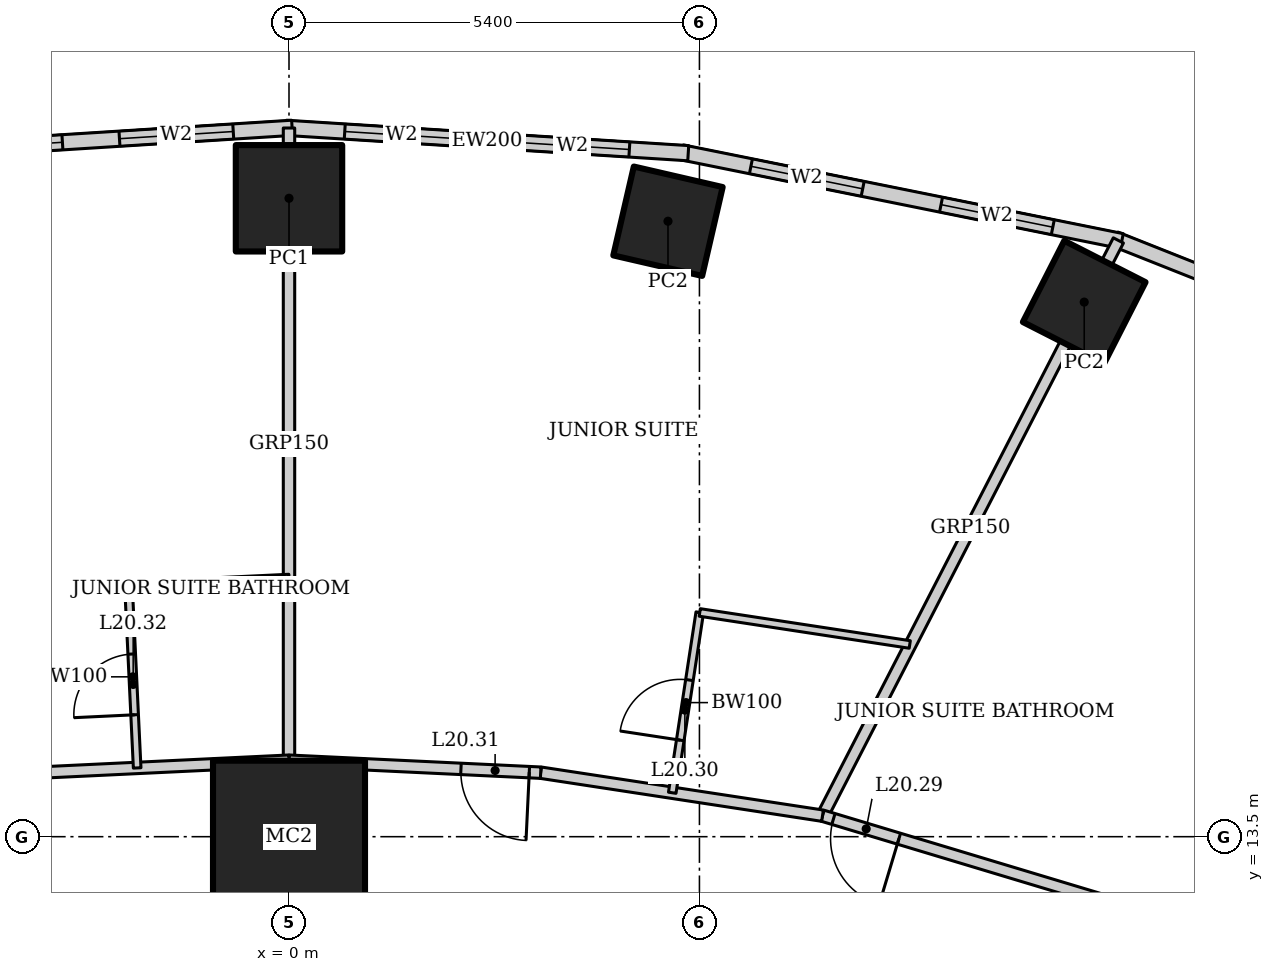
"""IFC4 building model, lengths in metres.
Left out: names, types, materials, properties, quantities, classifications, styles, units other than length and angle.
Written with IfcOpenShell. Run it as: python <this file> out.ifc"""

import sys

from ifc_helpers import new_model, si_unit, direction, frame, frame_2d, origin, origin_2d, place, context, subcontext, project, spatial, rectangle, hollow_rectangle, extrude, element, fill, save


model = new_model("IFC4")
c1 = context("Model", 3, precision=1e-05, world=origin(), true_north=direction((0.0, 1.0)))
c2 = subcontext(c1, "Body", "Model", "MODEL_VIEW")
j1 = project(units=[si_unit("LENGTHUNIT", "METRE"), si_unit("PLANEANGLEUNIT", "RADIAN")], contexts=[c1])
p1 = place(None, origin())
s1 = spatial("IfcSite", under=j1, at=p1, CompositionType="ELEMENT")
p2 = place(p1, origin())
s2 = spatial("IfcBuilding", under=s1, at=p2, CompositionType="ELEMENT")
p3 = place(p2, frame((0.0, 0.0, 87.4)))
s3 = spatial("IfcBuildingStorey", under=s2, at=p3, CompositionType="ELEMENT", Elevation=87.4)
p4 = place(p3, frame((0.0, 13.5, 0.0), z_axis=(0.0, 0.0, 1.0), x_axis=(1.0, 0.0, 0.0)))
e1 = element("IfcColumn", 1, at=p4, inside=s3, PredefinedType="COLUMN", context=c2, shape_type="SweptSolid", body=[
    extrude(hollow_rectangle(XDim=2.0, YDim=2.0, WallThickness=0.17, at=origin_2d()), origin(), (0.0, 0.0, 1.0), 3.6),
])
for number, where, z_axis, x_axis in (
    (2, (10.463, 20.534, 0.0), (0.0, 0.0, 1.0), (0.454, 0.891, 0.0)),
    (3, (4.986, 21.598, 0.0), (0.0, 0.0, 1.0), (0.225, 0.974, 0.0)),
):
    element("IfcColumn", number, at=place(p3, frame(where, z_axis=z_axis, x_axis=x_axis)), inside=s3, PredefinedType="COLUMN", context=c2, shape_type="SweptSolid", body=[
        extrude(hollow_rectangle(XDim=1.2, YDim=1.2, WallThickness=0.1, at=origin_2d()), origin(), (0.0, 0.0, 1.0), 3.6),
    ])
p5 = place(p3, frame((0.0, 21.9, 0.0), z_axis=(0.0, 0.0, 1.0), x_axis=(1.0, 0.0, 0.0)))
e4 = element("IfcColumn", 4, at=p5, inside=s3, PredefinedType="COLUMN", context=c2, shape_type="SweptSolid", body=[
    extrude(hollow_rectangle(XDim=1.4, YDim=1.4, WallThickness=0.1, at=origin_2d()), origin(), (0.0, 0.0, 1.0), 3.6),
])
p6 = place(p3, frame((18.018, 18.523, 0.0), z_axis=(0.0, 0.0, 1.0), x_axis=(-0.929358351251, 0.369178892895, 0.0)))
e5 = element("IfcWall", 5, at=p6, inside=s3, PredefinedType="SOLIDWALL", context=c2, shape_type="SweptSolid", body=[
    extrude(rectangle(XDim=7.692, YDim=0.2, at=frame_2d((3.846, 0.0))), origin(), (0.0, 0.0, 1.0), 3.45),
])
p7 = place(p6, frame((1.373, 0.0, 0.5)))
e6 = element("IfcOpeningElement", 6, at=p7, cuts=e5, PredefinedType="OPENING", context=c2, shape_type="SweptSolid", body=[
    extrude(rectangle(XDim=1.5, YDim=2.2, at=frame_2d((0.75, 1.1))), frame((0.0, 0.11, 0.0), z_axis=(0.0, -1.0, 0.0), x_axis=(1.0, 0.0, 0.0)), (0.0, 0.0, 1.0), 0.22),
])
p8 = place(p6, frame((4.819, 0.0, 0.5)))
e7 = element("IfcOpeningElement", 7, at=p8, cuts=e5, PredefinedType="OPENING", context=c2, shape_type="SweptSolid", body=[
    extrude(rectangle(XDim=1.5, YDim=2.2, at=frame_2d((0.75, 1.1))), frame((0.0, 0.11, 0.0), z_axis=(0.0, -1.0, 0.0), x_axis=(1.0, 0.0, 0.0)), (0.0, 0.0, 1.0), 0.22),
])
p9 = place(p3, frame((10.957, 21.337, 0.0), z_axis=(0.0, 0.0, 1.0), x_axis=(-0.980251657452, 0.197754110105, 0.0)))
e8 = element("IfcWall", 8, at=p9, inside=s3, PredefinedType="SOLIDWALL", context=c2, shape_type="SweptSolid", body=[
    extrude(rectangle(XDim=5.904, YDim=0.2, at=frame_2d((2.952, 0.0))), origin(), (0.0, 0.0, 1.0), 3.45),
])
p10 = place(p9, frame((0.926, 0.0, 0.5)))
e9 = element("IfcOpeningElement", 9, at=p10, cuts=e8, PredefinedType="OPENING", context=c2, shape_type="SweptSolid", body=[
    extrude(rectangle(XDim=1.5, YDim=2.2, at=frame_2d((0.75, 1.1))), frame((0.0, 0.11, 0.0), z_axis=(0.0, -1.0, 0.0), x_axis=(1.0, 0.0, 0.0)), (0.0, 0.0, 1.0), 0.22),
])
p11 = place(p9, frame((3.478, 0.0, 0.5)))
e10 = element("IfcOpeningElement", 10, at=p11, cuts=e8, PredefinedType="OPENING", context=c2, shape_type="SweptSolid", body=[
    extrude(rectangle(XDim=1.5, YDim=2.2, at=frame_2d((0.75, 1.1))), frame((0.0, 0.11, 0.0), z_axis=(0.0, -1.0, 0.0), x_axis=(1.0, 0.0, 0.0)), (0.0, 0.0, 1.0), 0.22),
])
p12 = place(p3, frame((5.253, 22.493, 0.0), z_axis=(0.0, 0.0, 1.0), x_axis=(-0.998018582375, 0.062919863585, 0.0)))
e11 = element("IfcWall", 11, at=p12, inside=s3, PredefinedType="SOLIDWALL", context=c2, shape_type="SweptSolid", body=[
    extrude(rectangle(XDim=5.304, YDim=0.2, at=frame_2d((2.652, 0.0))), origin(), (0.0, 0.0, 1.0), 3.45),
])
p13 = place(p12, frame((0.776, 0.0, 0.5)))
e12 = element("IfcOpeningElement", 12, at=p13, cuts=e11, PredefinedType="OPENING", context=c2, shape_type="SweptSolid", body=[
    extrude(rectangle(XDim=1.5, YDim=2.2, at=frame_2d((0.75, 1.1))), frame((0.0, 0.11, 0.0), z_axis=(0.0, -1.0, 0.0), x_axis=(1.0, 0.0, 0.0)), (0.0, 0.0, 1.0), 0.22),
])
p14 = place(p12, frame((3.028, 0.0, 0.5)))
e13 = element("IfcOpeningElement", 13, at=p14, cuts=e11, PredefinedType="OPENING", context=c2, shape_type="SweptSolid", body=[
    extrude(rectangle(XDim=1.5, YDim=2.2, at=frame_2d((0.75, 1.1))), frame((0.0, 0.11, 0.0), z_axis=(0.0, -1.0, 0.0), x_axis=(1.0, 0.0, 0.0)), (0.0, 0.0, 1.0), 0.22),
])
p15 = place(p3, frame((0.041, 22.827, 0.0), z_axis=(0.0, 0.0, 1.0), x_axis=(-0.998018582375, -0.062919863585, 0.0)))
e14 = element("IfcWall", 14, at=p15, inside=s3, PredefinedType="SOLIDWALL", context=c2, shape_type="SweptSolid", body=[
    extrude(rectangle(XDim=5.304, YDim=0.2, at=frame_2d((2.652, 0.0))), origin(), (0.0, 0.0, 1.0), 3.45),
])
p16 = place(p15, frame((0.776, 0.0, 0.5)))
e15 = element("IfcOpeningElement", 15, at=p16, cuts=e14, PredefinedType="OPENING", context=c2, shape_type="SweptSolid", body=[
    extrude(rectangle(XDim=1.5, YDim=2.2, at=frame_2d((0.75, 1.1))), frame((0.0, 0.11, 0.0), z_axis=(0.0, -1.0, 0.0), x_axis=(1.0, 0.0, 0.0)), (0.0, 0.0, 1.0), 0.22),
])
p17 = place(p15, frame((3.028, 0.0, 0.5)))
e16 = element("IfcOpeningElement", 16, at=p17, cuts=e14, PredefinedType="OPENING", context=c2, shape_type="SweptSolid", body=[
    extrude(rectangle(XDim=1.5, YDim=2.2, at=frame_2d((0.75, 1.1))), frame((0.0, 0.11, 0.0), z_axis=(0.0, -1.0, 0.0), x_axis=(1.0, 0.0, 0.0)), (0.0, 0.0, 1.0), 0.22),
])
p18 = place(p3, frame((10.912, 21.346, 0.0), z_axis=(0.0, 0.0, 1.0), x_axis=(-0.457327273085, -0.889298468059, 0.0)))
e17 = element("IfcWall", 17, at=p18, inside=s3, PredefinedType="PARTITIONING", context=c2, shape_type="SweptSolid", body=[
    extrude(rectangle(XDim=8.511, YDim=0.15, at=frame_2d((4.256, 0.0))), origin(), (0.0, 0.0, 1.0), 2.528),
])
p19 = place(p3, frame((0.0, 22.825, 0.0), z_axis=(0.0, 0.0, 1.0), x_axis=(0.0, -1.0, 0.0)))
e18 = element("IfcWall", 18, at=p19, inside=s3, PredefinedType="PARTITIONING", context=c2, shape_type="SweptSolid", body=[
    extrude(rectangle(XDim=8.325, YDim=0.15, at=frame_2d((4.162, 0.0))), origin(), (0.0, 0.0, 1.0), 2.924),
])
p20 = place(p3, frame((11.888, 12.311, 0.0), z_axis=(0.0, 0.0, 1.0), x_axis=(-0.957564241242, 0.288219922793, 0.0)))
e19 = element("IfcWall", 19, at=p20, inside=s3, PredefinedType="PARTITIONING", context=c2, shape_type="SweptSolid", body=[
    extrude(rectangle(XDim=5.085, YDim=0.15, at=frame_2d((2.542, 0.0))), origin(), (0.0, 0.0, 1.0), 3.45),
])
p21 = place(p20, frame((4.035, 0.0, 0.0)))
e20 = element("IfcOpeningElement", 20, at=p21, cuts=e19, PredefinedType="OPENING", context=c2, shape_type="SweptSolid", body=[
    extrude(rectangle(XDim=0.9, YDim=2.1, at=frame_2d((0.45, 1.05))), frame((0.0, 0.085, 0.0), z_axis=(0.0, -1.0, 0.0), x_axis=(1.0, 0.0, 0.0)), (0.0, 0.0, 1.0), 0.17),
])
p22 = place(p3, frame((7.019, 13.776, 0.0), z_axis=(0.0, 0.0, 1.0), x_axis=(-0.988564270062, 0.150800145746, 0.0)))
e21 = element("IfcWall", 21, at=p22, inside=s3, PredefinedType="PARTITIONING", context=c2, shape_type="SweptSolid", body=[
    extrude(rectangle(XDim=3.751, YDim=0.15, at=frame_2d((1.875, 0.0))), origin(), (0.0, 0.0, 1.0), 3.45),
])
p23 = place(p3, frame((3.311, 14.342, 0.0), z_axis=(0.0, 0.0, 1.0), x_axis=(-0.998863968075, 0.047652631422, 0.0)))
e22 = element("IfcWall", 22, at=p23, inside=s3, PredefinedType="PARTITIONING", context=c2, shape_type="SweptSolid", body=[
    extrude(rectangle(XDim=3.315, YDim=0.15, at=frame_2d((1.657, 0.0))), origin(), (0.0, 0.0, 1.0), 3.45),
])
p24 = place(p23, frame((0.15, 0.0, 0.0)))
e23 = element("IfcOpeningElement", 23, at=p24, cuts=e22, PredefinedType="OPENING", context=c2, shape_type="SweptSolid", body=[
    extrude(rectangle(XDim=0.9, YDim=2.1, at=frame_2d((0.45, 1.05))), frame((0.0, 0.085, 0.0), z_axis=(0.0, -1.0, 0.0), x_axis=(1.0, 0.0, 0.0)), (0.0, 0.0, 1.0), 0.17),
])
p25 = place(p3, frame((0.0, 14.5, 0.0), z_axis=(0.0, 0.0, 1.0), x_axis=(-0.998863968075, -0.047652631422, 0.0)))
e24 = element("IfcWall", 24, at=p25, inside=s3, PredefinedType="PARTITIONING", context=c2, shape_type="SweptSolid", body=[
    extrude(rectangle(XDim=3.315, YDim=0.15, at=frame_2d((1.657, 0.0))), origin(), (0.0, 0.0, 1.0), 3.45),
])
p26 = place(p3, frame((5.042, 14.078, 0.0), z_axis=(0.0, 0.0, 1.0), x_axis=(0.150856962013, 0.988555601376, 0.0)))
e25 = element("IfcWall", 25, at=p26, inside=s3, PredefinedType="PARTITIONING", context=c2, shape_type="SweptSolid", body=[
    extrude(rectangle(XDim=2.4, YDim=0.1, at=frame_2d((1.2, 0.0))), origin(), (0.0, 0.0, 1.0), 3.45),
])
p27 = place(p26, frame((0.7, 0.0, 0.0)))
e26 = element("IfcOpeningElement", 26, at=p27, cuts=e25, PredefinedType="OPENING", context=c2, shape_type="SweptSolid", body=[
    extrude(rectangle(XDim=0.8, YDim=2.1, at=frame_2d((0.4, 1.05))), frame((0.0, 0.06, 0.0), z_axis=(0.0, -1.0, 0.0), x_axis=(1.0, 0.0, 0.0)), (0.0, 0.0, 1.0), 0.12),
])
p28 = place(p3, frame((5.404, 16.45, 0.0), z_axis=(0.0, 0.0, 1.0), x_axis=(0.988568792086, -0.150770498819, 0.0)))
e27 = element("IfcWall", 27, at=p28, inside=s3, PredefinedType="PARTITIONING", context=c2, shape_type="SweptSolid", body=[
    extrude(rectangle(XDim=2.795, YDim=0.1, at=frame_2d((1.397, 0.0))), origin(), (0.0, 0.0, 1.0), 3.45),
])
p29 = place(p3, frame((-1.998, 14.405, 0.0), z_axis=(0.0, 0.0, 1.0), x_axis=(-0.047608648396, 0.998866065395, 0.0)))
e28 = element("IfcWall", 28, at=p29, inside=s3, PredefinedType="PARTITIONING", context=c2, shape_type="SweptSolid", body=[
    extrude(rectangle(XDim=2.4, YDim=0.1, at=frame_2d((1.2, 0.0))), origin(), (0.0, 0.0, 1.0), 2.749),
])
p30 = place(p29, frame((0.7, 0.0, 0.0)))
e29 = element("IfcOpeningElement", 29, at=p30, cuts=e28, PredefinedType="OPENING", context=c2, shape_type="SweptSolid", body=[
    extrude(rectangle(XDim=0.8, YDim=2.1, at=frame_2d((0.4, 1.05))), frame((0.0, 0.06, 0.0), z_axis=(0.0, -1.0, 0.0), x_axis=(1.0, 0.0, 0.0)), (0.0, 0.0, 1.0), 0.12),
])
p31 = place(p3, frame((-2.112, 16.802, 0.0), z_axis=(0.0, 0.0, 1.0), x_axis=(0.998862383453, 0.047685835668, 0.0)))
e30 = element("IfcWall", 30, at=p31, inside=s3, PredefinedType="PARTITIONING", context=c2, shape_type="SweptSolid", body=[
    extrude(rectangle(XDim=2.115, YDim=0.1, at=frame_2d((1.057, 0.0))), origin(), (0.0, 0.0, 1.0), 3.45),
])
p32 = place(p10, origin())
e31 = element("IfcWindow", 31, at=p32, inside=s3, PartitioningType="SINGLE_PANEL", PredefinedType="WINDOW", context=c2, shape_type="SweptSolid", body=[
    extrude(rectangle(XDim=1.5, YDim=2.2, at=frame_2d((0.75, 1.1))), frame((0.0, 0.03, 0.0), z_axis=(0.0, -1.0, 0.0), x_axis=(1.0, 0.0, 0.0)), (0.0, 0.0, 1.0), 0.06),
])
fill(e9, e31)
p33 = place(p11, origin())
e32 = element("IfcWindow", 32, at=p33, inside=s3, PartitioningType="SINGLE_PANEL", PredefinedType="WINDOW", context=c2, shape_type="SweptSolid", body=[
    extrude(rectangle(XDim=1.5, YDim=2.2, at=frame_2d((0.75, 1.1))), frame((0.0, 0.03, 0.0), z_axis=(0.0, -1.0, 0.0), x_axis=(1.0, 0.0, 0.0)), (0.0, 0.0, 1.0), 0.06),
])
fill(e10, e32)
p34 = place(p13, origin())
e33 = element("IfcWindow", 33, at=p34, inside=s3, PartitioningType="SINGLE_PANEL", PredefinedType="WINDOW", context=c2, shape_type="SweptSolid", body=[
    extrude(rectangle(XDim=1.5, YDim=2.2, at=frame_2d((0.75, 1.1))), frame((0.0, 0.03, 0.0), z_axis=(0.0, -1.0, 0.0), x_axis=(1.0, 0.0, 0.0)), (0.0, 0.0, 1.0), 0.06),
])
fill(e12, e33)
p35 = place(p14, origin())
e34 = element("IfcWindow", 34, at=p35, inside=s3, PartitioningType="SINGLE_PANEL", PredefinedType="WINDOW", context=c2, shape_type="SweptSolid", body=[
    extrude(rectangle(XDim=1.5, YDim=2.2, at=frame_2d((0.75, 1.1))), frame((0.0, 0.03, 0.0), z_axis=(0.0, -1.0, 0.0), x_axis=(1.0, 0.0, 0.0)), (0.0, 0.0, 1.0), 0.06),
])
fill(e13, e34)
p36 = place(p16, origin())
e35 = element("IfcWindow", 35, at=p36, inside=s3, PartitioningType="SINGLE_PANEL", PredefinedType="WINDOW", context=c2, shape_type="SweptSolid", body=[
    extrude(rectangle(XDim=1.5, YDim=2.2, at=frame_2d((0.75, 1.1))), frame((0.0, 0.03, 0.0), z_axis=(0.0, -1.0, 0.0), x_axis=(1.0, 0.0, 0.0)), (0.0, 0.0, 1.0), 0.06),
])
fill(e15, e35)
p37 = place(p17, origin())
e36 = element("IfcWindow", 36, at=p37, inside=s3, PartitioningType="SINGLE_PANEL", PredefinedType="WINDOW", context=c2, shape_type="SweptSolid", body=[
    extrude(rectangle(XDim=1.5, YDim=2.2, at=frame_2d((0.75, 1.1))), frame((0.0, 0.03, 0.0), z_axis=(0.0, -1.0, 0.0), x_axis=(1.0, 0.0, 0.0)), (0.0, 0.0, 1.0), 0.06),
])
fill(e16, e36)
p38 = place(p21, origin())
e37 = element("IfcDoor", 37, at=p38, inside=s3, OperationType="SINGLE_SWING_LEFT", PredefinedType="DOOR", context=c2, shape_type="SweptSolid", body=[
    extrude(rectangle(XDim=0.9, YDim=2.1, at=frame_2d((0.45, 1.05))), frame((0.0, 0.025, 0.0), z_axis=(0.0, -1.0, 0.0), x_axis=(1.0, 0.0, 0.0)), (0.0, 0.0, 1.0), 0.05),
])
fill(e20, e37)
p39 = place(p27, origin())
e38 = element("IfcDoor", 38, at=p39, inside=s3, OperationType="SINGLE_SWING_LEFT", PredefinedType="DOOR", context=c2, shape_type="SweptSolid", body=[
    extrude(rectangle(XDim=0.8, YDim=2.1, at=frame_2d((0.4, 1.05))), frame((0.0, 0.025, 0.0), z_axis=(0.0, -1.0, 0.0), x_axis=(1.0, 0.0, 0.0)), (0.0, 0.0, 1.0), 0.05),
])
fill(e26, e38)
p40 = place(p24, origin())
e39 = element("IfcDoor", 39, at=p40, inside=s3, OperationType="SINGLE_SWING_LEFT", PredefinedType="DOOR", context=c2, shape_type="SweptSolid", body=[
    extrude(rectangle(XDim=0.9, YDim=2.1, at=frame_2d((0.45, 1.05))), frame((0.0, 0.025, 0.0), z_axis=(0.0, -1.0, 0.0), x_axis=(1.0, 0.0, 0.0)), (0.0, 0.0, 1.0), 0.05),
])
fill(e23, e39)
p41 = place(p30, origin())
e40 = element("IfcDoor", 40, at=p41, inside=s3, OperationType="SINGLE_SWING_LEFT", PredefinedType="DOOR", context=c2, shape_type="SweptSolid", body=[
    extrude(rectangle(XDim=0.8, YDim=2.1, at=frame_2d((0.4, 1.05))), frame((0.0, 0.025, 0.0), z_axis=(0.0, -1.0, 0.0), x_axis=(1.0, 0.0, 0.0)), (0.0, 0.0, 1.0), 0.05),
])
fill(e29, e40)
save(model, sys.argv[1])
